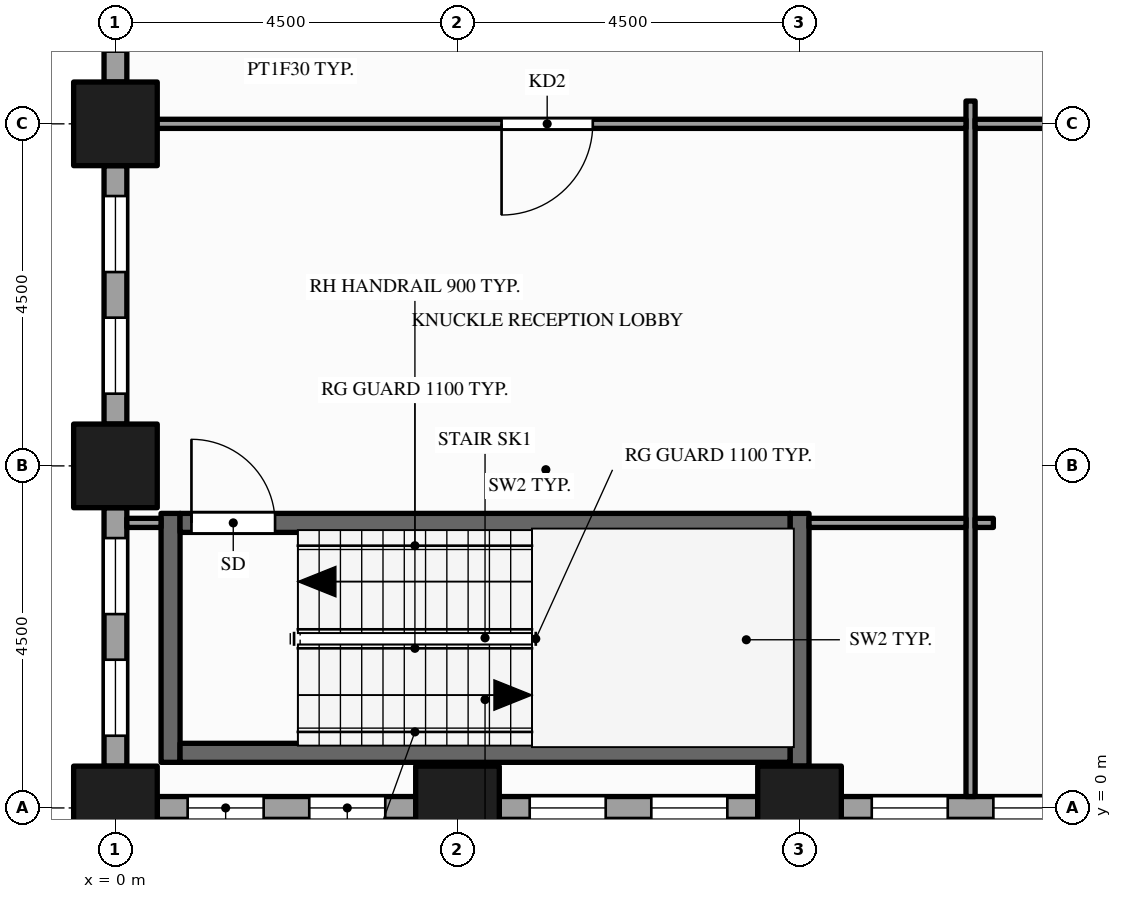
"""IFC4 building model, lengths in metres.
Left out: names, types, materials, properties, quantities, classifications, styles, units other than length and angle.
Written with IfcOpenShell. Run it as: python <this file> out.ifc"""

import sys

from ifc_helpers import new_model, si_unit, direction, frame, frame_2d, origin, origin_2d, place, context, subcontext, project, spatial, rectangle, hollow_rectangle, extrude, element, fill, save


model = new_model("IFC4")
c1 = context("Model", 3, precision=1e-05, world=origin(), true_north=direction((0.0, 1.0)))
c2 = subcontext(c1, "Body", "Model", "MODEL_VIEW")
j1 = project(units=[si_unit("LENGTHUNIT", "METRE"), si_unit("PLANEANGLEUNIT", "RADIAN")], contexts=[c1])
p1 = place(None, origin())
s1 = spatial("IfcSite", under=j1, at=p1, CompositionType="ELEMENT")
p2 = place(p1, origin())
s2 = spatial("IfcBuilding", under=s1, at=p2, CompositionType="ELEMENT")
p3 = place(p2, frame((0.0, 0.0, 73.0)))
s3 = spatial("IfcBuildingStorey", under=s2, at=p3, CompositionType="ELEMENT", Elevation=73.0)
for number, where, z_axis, x_axis in (
    (1, (0.0, 0.0, -0.15), (0.0, 0.0, 1.0), (1.0, 0.0, 0.0)),
    (2, (0.0, 4.5, -0.15), (0.0, 0.0, 1.0), (1.0, 0.0, 0.0)),
    (3, (0.0, 9.0, -0.15), (0.0, 0.0, 1.0), (1.0, 0.0, 0.0)),
    (4, (4.5, 0.0, -0.15), (0.0, 0.0, 1.0), (1.0, 0.0, 0.0)),
    (5, (9.0, 0.0, -0.15), (0.0, 0.0, 1.0), (1.0, 0.0, 0.0)),
):
    element("IfcColumn", number, at=place(p3, frame(where, z_axis=z_axis, x_axis=x_axis)), inside=s3, PredefinedType="COLUMN", context=c2, shape_type="SweptSolid", body=[
        extrude(hollow_rectangle(XDim=1.1, YDim=1.1, WallThickness=0.06, at=origin_2d()), origin(), (0.0, 0.0, 1.0), 3.9),
    ])
p4 = place(p3, frame((0.55, 0.0, 0.0), z_axis=(0.0, 0.0, 1.0), x_axis=(1.0, 0.0, 0.0)))
e6 = element("IfcWall", 6, at=p4, inside=s3, PredefinedType="STANDARD", context=c2, shape_type="SweptSolid", body=[
    extrude(rectangle(XDim=3.4, YDim=0.3, at=frame_2d((1.7, 0.0))), origin(), (0.0, 0.0, 1.0), 3.044),
])
p5 = place(p4, frame((0.4, 0.0, 0.9)))
e7 = element("IfcOpeningElement", 7, at=p5, cuts=e6, PredefinedType="OPENING", context=c2, shape_type="SweptSolid", body=[
    extrude(rectangle(XDim=1.0, YDim=2.0, at=frame_2d((0.5, 1.0))), frame((0.0, 0.16, 0.0), z_axis=(0.0, -1.0, 0.0), x_axis=(1.0, 0.0, 0.0)), (0.0, 0.0, 1.0), 0.32),
])
p6 = place(p4, frame((2.0, 0.0, 0.9)))
e8 = element("IfcOpeningElement", 8, at=p6, cuts=e6, PredefinedType="OPENING", context=c2, shape_type="SweptSolid", body=[
    extrude(rectangle(XDim=1.0, YDim=2.0, at=frame_2d((0.5, 1.0))), frame((0.0, 0.16, 0.0), z_axis=(0.0, -1.0, 0.0), x_axis=(1.0, 0.0, 0.0)), (0.0, 0.0, 1.0), 0.32),
])
p7 = place(p3, frame((5.05, 0.0, 0.0), z_axis=(0.0, 0.0, 1.0), x_axis=(1.0, 0.0, 0.0)))
e9 = element("IfcWall", 9, at=p7, inside=s3, PredefinedType="STANDARD", context=c2, shape_type="SweptSolid", body=[
    extrude(rectangle(XDim=3.4, YDim=0.3, at=frame_2d((1.7, 0.0))), origin(), (0.0, 0.0, 1.0), 3.044),
])
p8 = place(p7, frame((0.4, 0.0, 0.9)))
e10 = element("IfcOpeningElement", 10, at=p8, cuts=e9, PredefinedType="OPENING", context=c2, shape_type="SweptSolid", body=[
    extrude(rectangle(XDim=1.0, YDim=2.0, at=frame_2d((0.5, 1.0))), frame((0.0, 0.16, 0.0), z_axis=(0.0, -1.0, 0.0), x_axis=(1.0, 0.0, 0.0)), (0.0, 0.0, 1.0), 0.32),
])
p9 = place(p7, frame((2.0, 0.0, 0.9)))
e11 = element("IfcOpeningElement", 11, at=p9, cuts=e9, PredefinedType="OPENING", context=c2, shape_type="SweptSolid", body=[
    extrude(rectangle(XDim=1.0, YDim=2.0, at=frame_2d((0.5, 1.0))), frame((0.0, 0.16, 0.0), z_axis=(0.0, -1.0, 0.0), x_axis=(1.0, 0.0, 0.0)), (0.0, 0.0, 1.0), 0.32),
])
p10 = place(p3, frame((9.55, 0.0, 0.0), z_axis=(0.0, 0.0, 1.0), x_axis=(1.0, 0.0, 0.0)))
e12 = element("IfcWall", 12, at=p10, inside=s3, PredefinedType="STANDARD", context=c2, shape_type="SweptSolid", body=[
    extrude(rectangle(XDim=3.4, YDim=0.3, at=frame_2d((1.7, 0.0))), origin(), (0.0, 0.0, 1.0), 3.044),
])
p11 = place(p10, frame((0.4, 0.0, 0.9)))
e13 = element("IfcOpeningElement", 13, at=p11, cuts=e12, PredefinedType="OPENING", context=c2, shape_type="SweptSolid", body=[
    extrude(rectangle(XDim=1.0, YDim=2.0, at=frame_2d((0.5, 1.0))), frame((0.0, 0.16, 0.0), z_axis=(0.0, -1.0, 0.0), x_axis=(1.0, 0.0, 0.0)), (0.0, 0.0, 1.0), 0.32),
])
p12 = place(p10, frame((2.0, 0.0, 0.9)))
e14 = element("IfcOpeningElement", 14, at=p12, cuts=e12, PredefinedType="OPENING", context=c2, shape_type="SweptSolid", body=[
    extrude(rectangle(XDim=1.0, YDim=2.0, at=frame_2d((0.5, 1.0))), frame((0.0, 0.16, 0.0), z_axis=(0.0, -1.0, 0.0), x_axis=(1.0, 0.0, 0.0)), (0.0, 0.0, 1.0), 0.32),
])
p13 = place(p3, frame((0.0, 12.95, 0.0), z_axis=(0.0, 0.0, 1.0), x_axis=(0.0, -1.0, 0.0)))
e15 = element("IfcWall", 15, at=p13, inside=s3, PredefinedType="STANDARD", context=c2, shape_type="SweptSolid", body=[
    extrude(rectangle(XDim=3.4, YDim=0.3, at=frame_2d((1.7, 0.0))), origin(), (0.0, 0.0, 1.0), 3.044),
])
p14 = place(p13, frame((0.4, 0.0, 0.9)))
e16 = element("IfcOpeningElement", 16, at=p14, cuts=e15, PredefinedType="OPENING", context=c2, shape_type="SweptSolid", body=[
    extrude(rectangle(XDim=1.0, YDim=2.0, at=frame_2d((0.5, 1.0))), frame((0.0, 0.16, 0.0), z_axis=(0.0, -1.0, 0.0), x_axis=(1.0, 0.0, 0.0)), (0.0, 0.0, 1.0), 0.32),
])
p15 = place(p13, frame((2.0, 0.0, 0.9)))
e17 = element("IfcOpeningElement", 17, at=p15, cuts=e15, PredefinedType="OPENING", context=c2, shape_type="SweptSolid", body=[
    extrude(rectangle(XDim=1.0, YDim=2.0, at=frame_2d((0.5, 1.0))), frame((0.0, 0.16, 0.0), z_axis=(0.0, -1.0, 0.0), x_axis=(1.0, 0.0, 0.0)), (0.0, 0.0, 1.0), 0.32),
])
p16 = place(p3, frame((0.0, 8.45, 0.0), z_axis=(0.0, 0.0, 1.0), x_axis=(0.0, -1.0, 0.0)))
e18 = element("IfcWall", 18, at=p16, inside=s3, PredefinedType="STANDARD", context=c2, shape_type="SweptSolid", body=[
    extrude(rectangle(XDim=3.4, YDim=0.3, at=frame_2d((1.7, 0.0))), origin(), (0.0, 0.0, 1.0), 3.044),
])
p17 = place(p16, frame((0.4, 0.0, 0.9)))
e19 = element("IfcOpeningElement", 19, at=p17, cuts=e18, PredefinedType="OPENING", context=c2, shape_type="SweptSolid", body=[
    extrude(rectangle(XDim=1.0, YDim=2.0, at=frame_2d((0.5, 1.0))), frame((0.0, 0.16, 0.0), z_axis=(0.0, -1.0, 0.0), x_axis=(1.0, 0.0, 0.0)), (0.0, 0.0, 1.0), 0.32),
])
p18 = place(p16, frame((2.0, 0.0, 0.9)))
e20 = element("IfcOpeningElement", 20, at=p18, cuts=e18, PredefinedType="OPENING", context=c2, shape_type="SweptSolid", body=[
    extrude(rectangle(XDim=1.0, YDim=2.0, at=frame_2d((0.5, 1.0))), frame((0.0, 0.16, 0.0), z_axis=(0.0, -1.0, 0.0), x_axis=(1.0, 0.0, 0.0)), (0.0, 0.0, 1.0), 0.32),
])
p19 = place(p3, frame((0.0, 3.95, 0.0), z_axis=(0.0, 0.0, 1.0), x_axis=(0.0, -1.0, 0.0)))
e21 = element("IfcWall", 21, at=p19, inside=s3, PredefinedType="STANDARD", context=c2, shape_type="SweptSolid", body=[
    extrude(rectangle(XDim=3.4, YDim=0.3, at=frame_2d((1.7, 0.0))), origin(), (0.0, 0.0, 1.0), 3.044),
])
p20 = place(p19, frame((0.4, 0.0, 0.9)))
e22 = element("IfcOpeningElement", 22, at=p20, cuts=e21, PredefinedType="OPENING", context=c2, shape_type="SweptSolid", body=[
    extrude(rectangle(XDim=1.0, YDim=2.0, at=frame_2d((0.5, 1.0))), frame((0.0, 0.16, 0.0), z_axis=(0.0, -1.0, 0.0), x_axis=(1.0, 0.0, 0.0)), (0.0, 0.0, 1.0), 0.32),
])
p21 = place(p19, frame((2.0, 0.0, 0.9)))
e23 = element("IfcOpeningElement", 23, at=p21, cuts=e21, PredefinedType="OPENING", context=c2, shape_type="SweptSolid", body=[
    extrude(rectangle(XDim=1.0, YDim=2.0, at=frame_2d((0.5, 1.0))), frame((0.0, 0.16, 0.0), z_axis=(0.0, -1.0, 0.0), x_axis=(1.0, 0.0, 0.0)), (0.0, 0.0, 1.0), 0.32),
])
p22 = place(p3, frame((0.725, 0.6, 0.0), z_axis=(0.0, 0.0, 1.0), x_axis=(0.0, 1.0, 0.0)))
e24 = element("IfcWall", 24, at=p22, inside=s3, PredefinedType="SHEAR", context=c2, shape_type="SweptSolid", body=[
    extrude(rectangle(XDim=3.275, YDim=0.25, at=frame_2d((1.637, 0.0))), origin(), (0.0, 0.0, 1.0), 3.75),
])
p23 = place(p3, frame((9.0, 0.55, 0.0), z_axis=(0.0, 0.0, 1.0), x_axis=(0.0, 1.0, 0.0)))
e25 = element("IfcWall", 25, at=p23, inside=s3, PredefinedType="SHEAR", context=c2, shape_type="SweptSolid", body=[
    extrude(rectangle(XDim=3.325, YDim=0.25, at=frame_2d((1.663, 0.0))), origin(), (0.0, 0.0, 1.0), 3.75),
])
p24 = place(p3, frame((11.25, 0.15, 0.0), z_axis=(0.0, 0.0, 1.0), x_axis=(0.0, 1.0, 0.0)))
e26 = element("IfcWall", 26, at=p24, inside=s3, PredefinedType="PARTITIONING", context=c2, shape_type="SweptSolid", body=[
    extrude(rectangle(XDim=9.15, YDim=0.12, at=frame_2d((4.575, 0.0))), origin(), (0.0, 0.0, 1.0), 2.838),
])
p25 = place(p3, frame((0.85, 0.725, 0.0), z_axis=(0.0, 0.0, 1.0), x_axis=(1.0, 0.0, 0.0)))
e27 = element("IfcWall", 27, at=p25, inside=s3, PredefinedType="SHEAR", context=c2, shape_type="SweptSolid", body=[
    extrude(rectangle(XDim=8.025, YDim=0.25, at=frame_2d((4.012, 0.0))), origin(), (0.0, 0.0, 1.0), 3.75),
])
p26 = place(p3, frame((0.15, 3.75, 0.0), z_axis=(0.0, 0.0, 1.0), x_axis=(1.0, 0.0, 0.0)))
e28 = element("IfcWall", 28, at=p26, inside=s3, PredefinedType="PARTITIONING", context=c2, shape_type="SweptSolid", body=[
    extrude(rectangle(XDim=0.45, YDim=0.12, at=frame_2d((0.225, 0.0))), origin(), (0.0, 0.0, 1.0), 3.75),
])
p27 = place(p3, frame((0.85, 3.75, 0.0), z_axis=(0.0, 0.0, 1.0), x_axis=(1.0, 0.0, 0.0)))
e29 = element("IfcWall", 29, at=p27, inside=s3, PredefinedType="SHEAR", context=c2, shape_type="SweptSolid", body=[
    extrude(rectangle(XDim=8.025, YDim=0.25, at=frame_2d((4.012, 0.0))), origin(), (0.0, 0.0, 1.0), 3.75),
])
p28 = place(p27, frame((0.15, 0.0, 0.0)))
e30 = element("IfcOpeningElement", 30, at=p28, cuts=e29, PredefinedType="OPENING", context=c2, shape_type="SweptSolid", body=[
    extrude(rectangle(XDim=1.1, YDim=2.1, at=frame_2d((0.55, 1.05))), frame((0.0, 0.135, 0.0), z_axis=(0.0, -1.0, 0.0), x_axis=(1.0, 0.0, 0.0)), (0.0, 0.0, 1.0), 0.27),
])
p29 = place(p3, frame((9.125, 3.75, 0.0), z_axis=(0.0, 0.0, 1.0), x_axis=(1.0, 0.0, 0.0)))
e31 = element("IfcWall", 31, at=p29, inside=s3, PredefinedType="PARTITIONING", context=c2, shape_type="SweptSolid", body=[
    extrude(rectangle(XDim=2.065, YDim=0.12, at=frame_2d((1.032, 0.0))), origin(), (0.0, 0.0, 1.0), 2.838),
])
p30 = place(p3, frame((11.31, 3.75, 0.0), z_axis=(0.0, 0.0, 1.0), x_axis=(1.0, 0.0, 0.0)))
e32 = element("IfcWall", 32, at=p30, inside=s3, PredefinedType="PARTITIONING", context=c2, shape_type="SweptSolid", body=[
    extrude(rectangle(XDim=0.24, YDim=0.12, at=frame_2d((0.12, 0.0))), origin(), (0.0, 0.0, 1.0), 2.838),
])
p31 = place(p3, frame((0.15, 9.0, 0.0), z_axis=(0.0, 0.0, 1.0), x_axis=(1.0, 0.0, 0.0)))
e33 = element("IfcWall", 33, at=p31, inside=s3, PredefinedType="PARTITIONING", context=c2, shape_type="SweptSolid", body=[
    extrude(rectangle(XDim=11.04, YDim=0.12, at=frame_2d((5.52, 0.0))), origin(), (0.0, 0.0, 1.0), 2.838),
])
p32 = place(p31, frame((4.93, 0.0, 0.0)))
e34 = element("IfcOpeningElement", 34, at=p32, cuts=e33, PredefinedType="OPENING", context=c2, shape_type="SweptSolid", body=[
    extrude(rectangle(XDim=1.2, YDim=2.1, at=frame_2d((0.6, 1.05))), frame((0.0, 0.07, 0.0), z_axis=(0.0, -1.0, 0.0), x_axis=(1.0, 0.0, 0.0)), (0.0, 0.0, 1.0), 0.14),
])
p33 = place(p3, frame((11.31, 9.0, 0.0), z_axis=(0.0, 0.0, 1.0), x_axis=(1.0, 0.0, 0.0)))
e35 = element("IfcWall", 35, at=p33, inside=s3, PredefinedType="PARTITIONING", context=c2, shape_type="SweptSolid", body=[
    extrude(rectangle(XDim=4.38, YDim=0.12, at=frame_2d((2.19, 0.0))), origin(), (0.0, 0.0, 1.0), 2.838),
])
p34 = place(p33, frame((1.69, 0.0, 0.0)))
e36 = element("IfcOpeningElement", 36, at=p34, cuts=e35, PredefinedType="OPENING", context=c2, shape_type="SweptSolid", body=[
    extrude(rectangle(XDim=1.0, YDim=2.1, at=frame_2d((0.5, 1.05))), frame((0.0, 0.07, 0.0), z_axis=(0.0, -1.0, 0.0), x_axis=(1.0, 0.0, 0.0)), (0.0, 0.0, 1.0), 0.14),
])
p35 = place(p5, origin())
e37 = element("IfcWindow", 37, at=p35, inside=s3, PartitioningType="SINGLE_PANEL", PredefinedType="WINDOW", context=c2, shape_type="SweptSolid", body=[
    extrude(rectangle(XDim=1.0, YDim=2.0, at=frame_2d((0.5, 1.0))), frame((0.0, 0.03, 0.0), z_axis=(0.0, -1.0, 0.0), x_axis=(1.0, 0.0, 0.0)), (0.0, 0.0, 1.0), 0.06),
])
fill(e7, e37)
p36 = place(p6, origin())
e38 = element("IfcWindow", 38, at=p36, inside=s3, PartitioningType="SINGLE_PANEL", PredefinedType="WINDOW", context=c2, shape_type="SweptSolid", body=[
    extrude(rectangle(XDim=1.0, YDim=2.0, at=frame_2d((0.5, 1.0))), frame((0.0, 0.03, 0.0), z_axis=(0.0, -1.0, 0.0), x_axis=(1.0, 0.0, 0.0)), (0.0, 0.0, 1.0), 0.06),
])
fill(e8, e38)
p37 = place(p8, origin())
e39 = element("IfcWindow", 39, at=p37, inside=s3, PartitioningType="SINGLE_PANEL", PredefinedType="WINDOW", context=c2, shape_type="SweptSolid", body=[
    extrude(rectangle(XDim=1.0, YDim=2.0, at=frame_2d((0.5, 1.0))), frame((0.0, 0.03, 0.0), z_axis=(0.0, -1.0, 0.0), x_axis=(1.0, 0.0, 0.0)), (0.0, 0.0, 1.0), 0.06),
])
fill(e10, e39)
p38 = place(p9, origin())
e40 = element("IfcWindow", 40, at=p38, inside=s3, PartitioningType="SINGLE_PANEL", PredefinedType="WINDOW", context=c2, shape_type="SweptSolid", body=[
    extrude(rectangle(XDim=1.0, YDim=2.0, at=frame_2d((0.5, 1.0))), frame((0.0, 0.03, 0.0), z_axis=(0.0, -1.0, 0.0), x_axis=(1.0, 0.0, 0.0)), (0.0, 0.0, 1.0), 0.06),
])
fill(e11, e40)
p39 = place(p11, origin())
e41 = element("IfcWindow", 41, at=p39, inside=s3, PartitioningType="SINGLE_PANEL", PredefinedType="WINDOW", context=c2, shape_type="SweptSolid", body=[
    extrude(rectangle(XDim=1.0, YDim=2.0, at=frame_2d((0.5, 1.0))), frame((0.0, 0.03, 0.0), z_axis=(0.0, -1.0, 0.0), x_axis=(1.0, 0.0, 0.0)), (0.0, 0.0, 1.0), 0.06),
])
fill(e13, e41)
p40 = place(p12, origin())
e42 = element("IfcWindow", 42, at=p40, inside=s3, PartitioningType="SINGLE_PANEL", PredefinedType="WINDOW", context=c2, shape_type="SweptSolid", body=[
    extrude(rectangle(XDim=1.0, YDim=2.0, at=frame_2d((0.5, 1.0))), frame((0.0, 0.03, 0.0), z_axis=(0.0, -1.0, 0.0), x_axis=(1.0, 0.0, 0.0)), (0.0, 0.0, 1.0), 0.06),
])
fill(e14, e42)
p41 = place(p17, origin())
e43 = element("IfcWindow", 43, at=p41, inside=s3, PartitioningType="SINGLE_PANEL", PredefinedType="WINDOW", context=c2, shape_type="SweptSolid", body=[
    extrude(rectangle(XDim=1.0, YDim=2.0, at=frame_2d((0.5, 1.0))), frame((0.0, 0.03, 0.0), z_axis=(0.0, -1.0, 0.0), x_axis=(1.0, 0.0, 0.0)), (0.0, 0.0, 1.0), 0.06),
])
fill(e19, e43)
p42 = place(p18, origin())
e44 = element("IfcWindow", 44, at=p42, inside=s3, PartitioningType="SINGLE_PANEL", PredefinedType="WINDOW", context=c2, shape_type="SweptSolid", body=[
    extrude(rectangle(XDim=1.0, YDim=2.0, at=frame_2d((0.5, 1.0))), frame((0.0, 0.03, 0.0), z_axis=(0.0, -1.0, 0.0), x_axis=(1.0, 0.0, 0.0)), (0.0, 0.0, 1.0), 0.06),
])
fill(e20, e44)
p43 = place(p20, origin())
e45 = element("IfcWindow", 45, at=p43, inside=s3, PartitioningType="SINGLE_PANEL", PredefinedType="WINDOW", context=c2, shape_type="SweptSolid", body=[
    extrude(rectangle(XDim=1.0, YDim=2.0, at=frame_2d((0.5, 1.0))), frame((0.0, 0.03, 0.0), z_axis=(0.0, -1.0, 0.0), x_axis=(1.0, 0.0, 0.0)), (0.0, 0.0, 1.0), 0.06),
])
fill(e22, e45)
p44 = place(p21, origin())
e46 = element("IfcWindow", 46, at=p44, inside=s3, PartitioningType="SINGLE_PANEL", PredefinedType="WINDOW", context=c2, shape_type="SweptSolid", body=[
    extrude(rectangle(XDim=1.0, YDim=2.0, at=frame_2d((0.5, 1.0))), frame((0.0, 0.03, 0.0), z_axis=(0.0, -1.0, 0.0), x_axis=(1.0, 0.0, 0.0)), (0.0, 0.0, 1.0), 0.06),
])
fill(e23, e46)
p45 = place(p28, origin())
e47 = element("IfcDoor", 47, at=p45, inside=s3, OperationType="SINGLE_SWING_LEFT", PredefinedType="DOOR", context=c2, shape_type="SweptSolid", body=[
    extrude(rectangle(XDim=1.1, YDim=2.1, at=frame_2d((0.55, 1.05))), frame((0.0, 0.025, 0.0), z_axis=(0.0, -1.0, 0.0), x_axis=(1.0, 0.0, 0.0)), (0.0, 0.0, 1.0), 0.05),
])
fill(e30, e47)
p46 = place(p32, origin())
e48 = element("IfcDoor", 48, at=p46, inside=s3, OperationType="SINGLE_SWING_LEFT", PredefinedType="DOOR", context=c2, shape_type="SweptSolid", body=[
    extrude(rectangle(XDim=1.2, YDim=2.1, at=frame_2d((0.6, 1.05))), frame((0.0, 0.025, 0.0), z_axis=(0.0, -1.0, 0.0), x_axis=(1.0, 0.0, 0.0)), (0.0, 0.0, 1.0), 0.05),
])
fill(e34, e48)
save(model, sys.argv[1])
